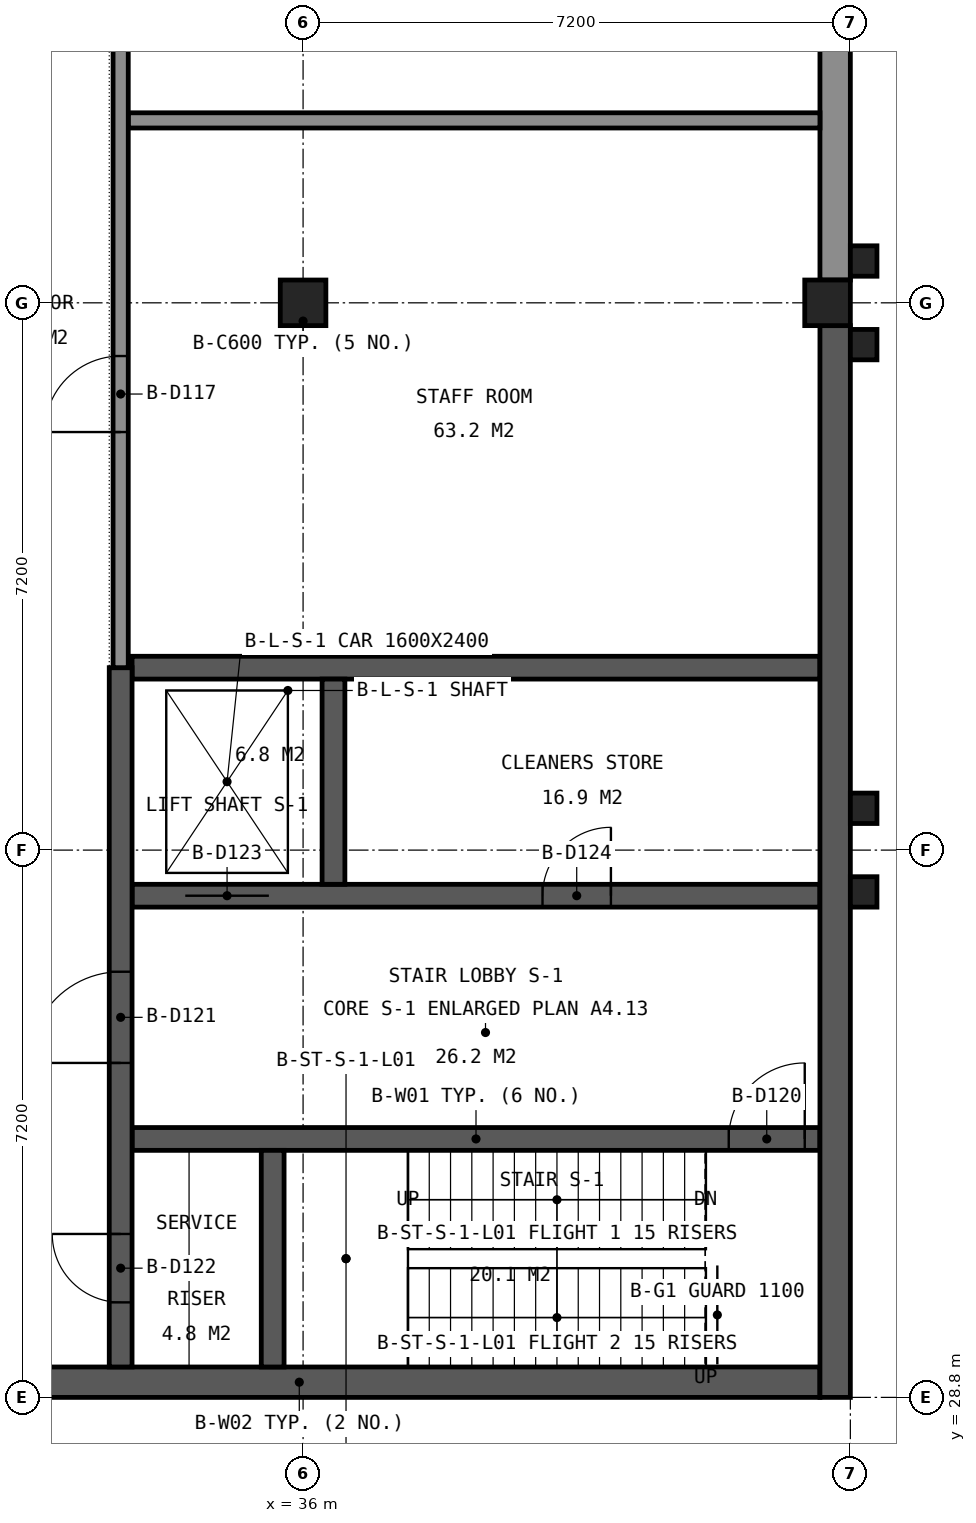
"""IFC4 building model, lengths in metres.
Left out: names, types, materials, properties, quantities, classifications, styles, units other than length and angle.
Written with IfcOpenShell. Run it as: python <this file> out.ifc"""

import sys

from ifc_helpers import new_model, si_unit, direction, frame, frame_2d, origin, origin_2d, place, context, subcontext, project, spatial, rectangle, extrude, element, fill, save


model = new_model("IFC4")
c1 = context("Model", 3, precision=1e-05, world=origin(), true_north=direction((0.0, 1.0)))
c2 = subcontext(c1, "Body", "Model", "MODEL_VIEW")
j1 = project(units=[si_unit("LENGTHUNIT", "METRE"), si_unit("PLANEANGLEUNIT", "RADIAN")], contexts=[c1])
p1 = place(None, origin())
s1 = spatial("IfcSite", under=j1, at=p1, CompositionType="ELEMENT")
p2 = place(p1, origin())
s2 = spatial("IfcBuilding", under=s1, at=p2, CompositionType="ELEMENT")
p3 = place(p2, frame((0.0, 0.0, 9.6)))
s3 = spatial("IfcBuildingStorey", under=s2, at=p3, CompositionType="ELEMENT", Elevation=9.6)
for number, where, z_axis, x_axis in (
    (1, (36.0, 43.2, 0.0), (0.0, 0.0, 1.0), (1.0, 0.0, 0.0)),
    (2, (42.9, 43.2, 0.0), (0.0, 0.0, 1.0), (1.0, 0.0, 0.0)),
):
    element("IfcColumn", number, at=place(p3, frame(where, z_axis=z_axis, x_axis=x_axis)), inside=s3, PredefinedType="COLUMN", context=c2, shape_type="SweptSolid", body=[
        extrude(rectangle(XDim=0.6, YDim=0.6, at=origin_2d()), origin(), (0.0, 0.0, 1.0), 4.8),
    ])
p4 = place(p3, frame((29.1, 29.0, 0.0), z_axis=(0.0, 0.0, 1.0), x_axis=(1.0, 0.0, 0.0)))
e3 = element("IfcWall", 3, at=p4, inside=s3, PredefinedType="SHEAR", context=c2, shape_type="SweptSolid", body=[
    extrude(rectangle(XDim=13.7, YDim=0.4, at=frame_2d((6.85, 0.0))), origin(), (0.0, 0.0, 1.0), 4.55),
])
p5 = place(p3, frame((33.75, 32.2, 0.0), z_axis=(0.0, 0.0, 1.0), x_axis=(1.0, 0.0, 0.0)))
e4 = element("IfcWall", 4, at=p5, inside=s3, PredefinedType="SHEAR", context=c2, shape_type="SweptSolid", body=[
    extrude(rectangle(XDim=9.05, YDim=0.3, at=frame_2d((4.525, 0.0))), origin(), (0.0, 0.0, 1.0), 4.55),
])
p6 = place(p5, frame((7.85, 0.0, 0.0)))
e5 = element("IfcOpeningElement", 5, at=p6, cuts=e4, PredefinedType="OPENING", context=c2, shape_type="SweptSolid", body=[
    extrude(rectangle(XDim=1.0, YDim=2.1, at=frame_2d((0.5, 1.05))), frame((0.0, 0.16, 0.0), z_axis=(0.0, -1.0, 0.0), x_axis=(1.0, 0.0, 0.0)), (0.0, 0.0, 1.0), 0.32),
])
p7 = place(p3, frame((33.75, 35.4, 0.0), z_axis=(0.0, 0.0, 1.0), x_axis=(1.0, 0.0, 0.0)))
e6 = element("IfcWall", 6, at=p7, inside=s3, PredefinedType="SHEAR", context=c2, shape_type="SweptSolid", body=[
    extrude(rectangle(XDim=9.05, YDim=0.3, at=frame_2d((4.525, 0.0))), origin(), (0.0, 0.0, 1.0), 4.55),
])
p8 = place(p7, frame((0.7, 0.0, 0.0)))
e7 = element("IfcOpeningElement", 7, at=p8, cuts=e6, PredefinedType="OPENING", context=c2, shape_type="SweptSolid", body=[
    extrude(rectangle(XDim=1.1, YDim=2.1, at=frame_2d((0.55, 1.05))), frame((0.0, 0.16, 0.0), z_axis=(0.0, -1.0, 0.0), x_axis=(1.0, 0.0, 0.0)), (0.0, 0.0, 1.0), 0.32),
])
p9 = place(p7, frame((5.4, 0.0, 0.0)))
e8 = element("IfcOpeningElement", 8, at=p9, cuts=e6, PredefinedType="OPENING", context=c2, shape_type="SweptSolid", body=[
    extrude(rectangle(XDim=0.9, YDim=2.1, at=frame_2d((0.45, 1.05))), frame((0.0, 0.16, 0.0), z_axis=(0.0, -1.0, 0.0), x_axis=(1.0, 0.0, 0.0)), (0.0, 0.0, 1.0), 0.32),
])
p10 = place(p3, frame((33.75, 38.4, 0.0), z_axis=(0.0, 0.0, 1.0), x_axis=(1.0, 0.0, 0.0)))
e9 = element("IfcWall", 9, at=p10, inside=s3, PredefinedType="SHEAR", context=c2, shape_type="SweptSolid", body=[
    extrude(rectangle(XDim=9.05, YDim=0.3, at=frame_2d((4.525, 0.0))), origin(), (0.0, 0.0, 1.0), 4.55),
])
p11 = place(p3, frame((33.6, 29.2, 0.0), z_axis=(0.0, 0.0, 1.0), x_axis=(0.0, 1.0, 0.0)))
e10 = element("IfcWall", 10, at=p11, inside=s3, PredefinedType="SHEAR", context=c2, shape_type="SweptSolid", body=[
    extrude(rectangle(XDim=9.2, YDim=0.3, at=frame_2d((4.6, 0.0))), origin(), (0.0, 0.0, 1.0), 4.55),
])
p12 = place(p11, frame((4.0, 0.0, 0.0)))
e11 = element("IfcOpeningElement", 11, at=p12, cuts=e10, PredefinedType="OPENING", context=c2, shape_type="SweptSolid", body=[
    extrude(rectangle(XDim=1.2, YDim=2.1, at=frame_2d((0.6, 1.05))), frame((0.0, 0.16, 0.0), z_axis=(0.0, -1.0, 0.0), x_axis=(1.0, 0.0, 0.0)), (0.0, 0.0, 1.0), 0.32),
])
p13 = place(p11, frame((0.85, 0.0, 0.0)))
e12 = element("IfcOpeningElement", 12, at=p13, cuts=e10, PredefinedType="OPENING", context=c2, shape_type="SweptSolid", body=[
    extrude(rectangle(XDim=0.9, YDim=2.1, at=frame_2d((0.45, 1.05))), frame((0.0, 0.16, 0.0), z_axis=(0.0, -1.0, 0.0), x_axis=(1.0, 0.0, 0.0)), (0.0, 0.0, 1.0), 0.32),
])
p14 = place(p3, frame((35.6, 29.2, 0.0), z_axis=(0.0, 0.0, 1.0), x_axis=(0.0, 1.0, 0.0)))
e13 = element("IfcWall", 13, at=p14, inside=s3, PredefinedType="SHEAR", context=c2, shape_type="SweptSolid", body=[
    extrude(rectangle(XDim=2.85, YDim=0.3, at=frame_2d((1.425, 0.0))), origin(), (0.0, 0.0, 1.0), 4.55),
])
p15 = place(p3, frame((36.4, 35.55, 0.0), z_axis=(0.0, 0.0, 1.0), x_axis=(0.0, 1.0, 0.0)))
e14 = element("IfcWall", 14, at=p15, inside=s3, PredefinedType="SHEAR", context=c2, shape_type="SweptSolid", body=[
    extrude(rectangle(XDim=2.7, YDim=0.3, at=frame_2d((1.35, 0.0))), origin(), (0.0, 0.0, 1.0), 4.55),
])
p16 = place(p3, frame((43.0, 28.8, 0.0), z_axis=(0.0, 0.0, 1.0), x_axis=(0.0, 1.0, 0.0)))
e15 = element("IfcWall", 15, at=p16, inside=s3, PredefinedType="SHEAR", context=c2, shape_type="SweptSolid", body=[
    extrude(rectangle(XDim=14.1, YDim=0.4, at=frame_2d((7.05, 0.0))), origin(), (0.0, 0.0, 1.0), 4.55),
])
p17 = place(p3, frame((43.0, 43.5, 0.0), z_axis=(0.0, 0.0, 1.0), x_axis=(0.0, 1.0, 0.0)))
e16 = element("IfcWall", 16, at=p17, inside=s3, PredefinedType="SOLIDWALL", context=c2, shape_type="SweptSolid", body=[
    extrude(rectangle(XDim=6.6, YDim=0.4, at=frame_2d((3.3, 0.0))), origin(), (0.0, 0.0, 1.0), 3.95),
])
p18 = place(p17, frame((3.625, 0.0, 0.9)))
e17 = element("IfcOpeningElement", 17, at=p18, cuts=e16, PredefinedType="OPENING", context=c2, shape_type="SweptSolid", body=[
    extrude(rectangle(XDim=0.7, YDim=2.4, at=frame_2d((0.35, 1.2))), frame((0.0, 0.21, 0.0), z_axis=(0.0, -1.0, 0.0), x_axis=(1.0, 0.0, 0.0)), (0.0, 0.0, 1.0), 0.42),
])
p19 = place(p17, frame((4.525, 0.0, 0.9)))
e18 = element("IfcOpeningElement", 18, at=p19, cuts=e16, PredefinedType="OPENING", context=c2, shape_type="SweptSolid", body=[
    extrude(rectangle(XDim=0.7, YDim=2.4, at=frame_2d((0.35, 1.2))), frame((0.0, 0.21, 0.0), z_axis=(0.0, -1.0, 0.0), x_axis=(1.0, 0.0, 0.0)), (0.0, 0.0, 1.0), 0.42),
])
for number, where, z_axis, x_axis in (
    (19, (43.375, 35.45, 0.0), (0.0, 0.0, 1.0), (1.0, 0.0, 0.0)),
    (20, (43.375, 36.55, 0.0), (0.0, 0.0, 1.0), (1.0, 0.0, 0.0)),
    (21, (43.375, 42.65, 0.0), (0.0, 0.0, 1.0), (1.0, 0.0, 0.0)),
    (22, (43.375, 43.75, 0.0), (0.0, 0.0, 1.0), (1.0, 0.0, 0.0)),
):
    element("IfcColumn", number, at=place(p3, frame(where, z_axis=z_axis, x_axis=x_axis)), inside=s3, PredefinedType="COLUMN", context=c2, shape_type="SweptSolid", body=[
        extrude(rectangle(XDim=0.35, YDim=0.4, at=origin_2d()), origin(), (0.0, 0.0, 1.0), 4.8),
    ])
p20 = place(p3, frame((43.275, 28.8, -0.15), z_axis=(0.0, 0.0, 1.0), x_axis=(0.0, 1.0, 0.0)))
e23 = element("IfcWall", 23, at=p20, inside=s3, PredefinedType="SOLIDWALL", context=c2, shape_type="SweptSolid", body=[
    extrude(rectangle(XDim=6.45, YDim=0.15, at=frame_2d((3.225, 0.0))), origin(), (0.0, 0.0, 1.0), 0.3),
])
p21 = place(p3, frame((43.275, 35.65, -0.15), z_axis=(0.0, 0.0, 1.0), x_axis=(0.0, 1.0, 0.0)))
e24 = element("IfcWall", 24, at=p21, inside=s3, PredefinedType="SOLIDWALL", context=c2, shape_type="SweptSolid", body=[
    extrude(rectangle(XDim=0.7, YDim=0.15, at=frame_2d((0.35, 0.0))), origin(), (0.0, 0.0, 1.0), 0.3),
])
p22 = place(p3, frame((43.275, 36.75, -0.15), z_axis=(0.0, 0.0, 1.0), x_axis=(0.0, 1.0, 0.0)))
e25 = element("IfcWall", 25, at=p22, inside=s3, PredefinedType="SOLIDWALL", context=c2, shape_type="SweptSolid", body=[
    extrude(rectangle(XDim=5.7, YDim=0.15, at=frame_2d((2.85, 0.0))), origin(), (0.0, 0.0, 1.0), 0.3),
])
p23 = place(p3, frame((43.275, 42.85, -0.15), z_axis=(0.0, 0.0, 1.0), x_axis=(0.0, 1.0, 0.0)))
e26 = element("IfcWall", 26, at=p23, inside=s3, PredefinedType="SOLIDWALL", context=c2, shape_type="SweptSolid", body=[
    extrude(rectangle(XDim=0.7, YDim=0.15, at=frame_2d((0.35, 0.0))), origin(), (0.0, 0.0, 1.0), 0.3),
])
p24 = place(p3, frame((43.275, 43.95, -0.15), z_axis=(0.0, 0.0, 1.0), x_axis=(0.0, 1.0, 0.0)))
e27 = element("IfcWall", 27, at=p24, inside=s3, PredefinedType="SOLIDWALL", context=c2, shape_type="SweptSolid", body=[
    extrude(rectangle(XDim=5.7, YDim=0.15, at=frame_2d((2.85, 0.0))), origin(), (0.0, 0.0, 1.0), 0.3),
])
p25 = place(p3, frame((33.7, 45.6, 0.0), z_axis=(0.0, 0.0, 1.0), x_axis=(1.0, 0.0, 0.0)))
e28 = element("IfcWall", 28, at=p25, inside=s3, PredefinedType="PARTITIONING", context=c2, shape_type="SweptSolid", body=[
    extrude(rectangle(XDim=9.1, YDim=0.2, at=frame_2d((4.55, 0.0))), origin(), (0.0, 0.0, 1.0), 3.95),
])
p26 = place(p3, frame((33.6, 38.4, 0.0), z_axis=(0.0, 0.0, 1.0), x_axis=(0.0, 1.0, 0.0)))
e29 = element("IfcWall", 29, at=p26, inside=s3, PredefinedType="PARTITIONING", context=c2, shape_type="SweptSolid", body=[
    extrude(rectangle(XDim=24.0, YDim=0.2, at=frame_2d((12.0, 0.0))), origin(), (0.0, 0.0, 1.0), 3.95),
])
p27 = place(p26, frame((3.1, 0.0, 0.0)))
e30 = element("IfcOpeningElement", 30, at=p27, cuts=e29, PredefinedType="OPENING", context=c2, shape_type="SweptSolid", body=[
    extrude(rectangle(XDim=1.0, YDim=2.1, at=frame_2d((0.5, 1.05))), frame((0.0, 0.11, 0.0), z_axis=(0.0, -1.0, 0.0), x_axis=(1.0, 0.0, 0.0)), (0.0, 0.0, 1.0), 0.22),
])
p28 = place(p26, frame((12.3, 0.0, 0.0)))
e31 = element("IfcOpeningElement", 31, at=p28, cuts=e29, PredefinedType="OPENING", context=c2, shape_type="SweptSolid", body=[
    extrude(rectangle(XDim=1.8, YDim=2.1, at=frame_2d((0.9, 1.05))), frame((0.0, 0.11, 0.0), z_axis=(0.0, -1.0, 0.0), x_axis=(1.0, 0.0, 0.0)), (0.0, 0.0, 1.0), 0.22),
])
p29 = place(p26, frame((21.1, 0.0, 0.0)))
e32 = element("IfcOpeningElement", 32, at=p29, cuts=e29, PredefinedType="OPENING", context=c2, shape_type="SweptSolid", body=[
    extrude(rectangle(XDim=1.0, YDim=2.1, at=frame_2d((0.5, 1.05))), frame((0.0, 0.11, 0.0), z_axis=(0.0, -1.0, 0.0), x_axis=(1.0, 0.0, 0.0)), (0.0, 0.0, 1.0), 0.22),
])
p30 = place(p27, origin())
e33 = element("IfcDoor", 33, at=p30, inside=s3, OperationType="SINGLE_SWING_LEFT", PredefinedType="DOOR", context=c2, shape_type="SweptSolid", body=[
    extrude(rectangle(XDim=1.0, YDim=2.1, at=frame_2d((0.5, 1.05))), frame((0.0, 0.025, 0.0), z_axis=(0.0, -1.0, 0.0), x_axis=(1.0, 0.0, 0.0)), (0.0, 0.0, 1.0), 0.05),
])
fill(e30, e33)
p31 = place(p6, origin())
e34 = element("IfcDoor", 34, at=p31, inside=s3, OperationType="SINGLE_SWING_RIGHT", PredefinedType="DOOR", context=c2, shape_type="SweptSolid", body=[
    extrude(rectangle(XDim=1.0, YDim=2.1, at=frame_2d((0.5, 1.05))), frame((0.0, 0.025, 0.0), z_axis=(0.0, -1.0, 0.0), x_axis=(1.0, 0.0, 0.0)), (0.0, 0.0, 1.0), 0.05),
])
fill(e5, e34)
p32 = place(p12, origin())
e35 = element("IfcDoor", 35, at=p32, inside=s3, OperationType="SINGLE_SWING_LEFT", PredefinedType="DOOR", context=c2, shape_type="SweptSolid", body=[
    extrude(rectangle(XDim=1.2, YDim=2.1, at=frame_2d((0.6, 1.05))), frame((0.0, 0.025, 0.0), z_axis=(0.0, -1.0, 0.0), x_axis=(1.0, 0.0, 0.0)), (0.0, 0.0, 1.0), 0.05),
])
fill(e11, e35)
p33 = place(p13, origin())
e36 = element("IfcDoor", 36, at=p33, inside=s3, OperationType="SINGLE_SWING_RIGHT", PredefinedType="DOOR", context=c2, shape_type="SweptSolid", body=[
    extrude(rectangle(XDim=0.9, YDim=2.1, at=frame_2d((0.45, 1.05))), frame((0.0, 0.025, 0.0), z_axis=(0.0, -1.0, 0.0), x_axis=(1.0, 0.0, 0.0)), (0.0, 0.0, 1.0), 0.05),
])
fill(e12, e36)
p34 = place(p8, origin())
e37 = element("IfcDoor", 37, at=p34, inside=s3, OperationType="SLIDING_TO_LEFT", PredefinedType="DOOR", context=c2, shape_type="SweptSolid", body=[
    extrude(rectangle(XDim=1.1, YDim=2.1, at=frame_2d((0.55, 1.05))), frame((0.0, 0.025, 0.0), z_axis=(0.0, -1.0, 0.0), x_axis=(1.0, 0.0, 0.0)), (0.0, 0.0, 1.0), 0.05),
])
fill(e7, e37)
p35 = place(p9, origin())
e38 = element("IfcDoor", 38, at=p35, inside=s3, OperationType="SINGLE_SWING_RIGHT", PredefinedType="DOOR", context=c2, shape_type="SweptSolid", body=[
    extrude(rectangle(XDim=0.9, YDim=2.1, at=frame_2d((0.45, 1.05))), frame((0.0, 0.025, 0.0), z_axis=(0.0, -1.0, 0.0), x_axis=(1.0, 0.0, 0.0)), (0.0, 0.0, 1.0), 0.05),
])
fill(e8, e38)
save(model, sys.argv[1])
